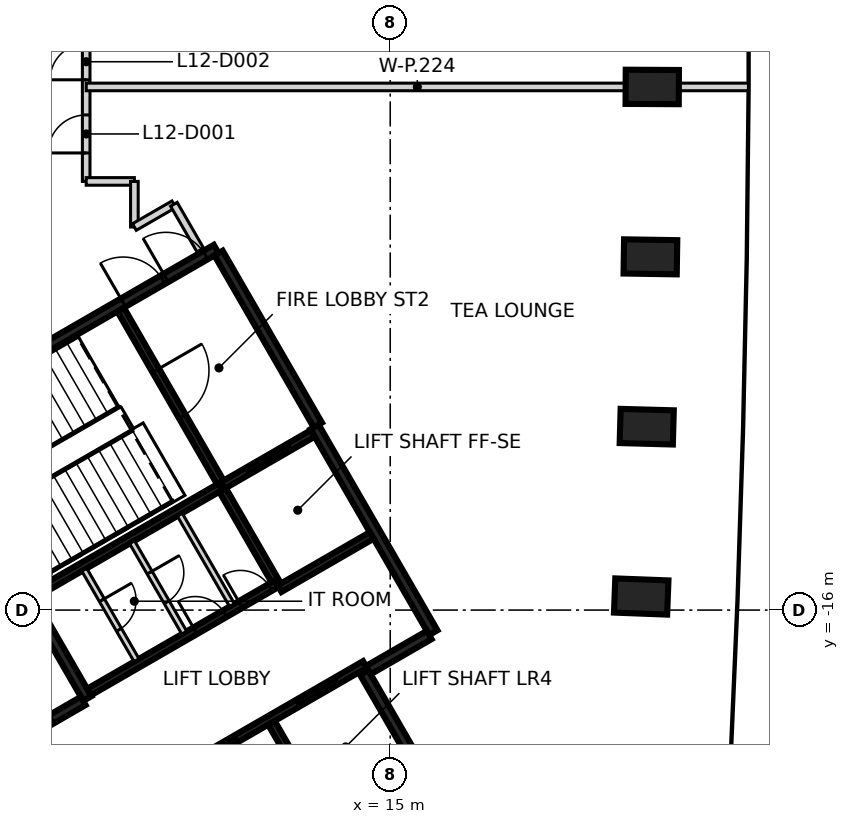
"""IFC4 building model, lengths in metres.
Left out: names, types, materials, properties, quantities, classifications, styles, units other than length and angle.
Written with IfcOpenShell. Run it as: python <this file> out.ifc"""

import sys

from ifc_helpers import new_model, si_unit, direction, frame, frame_2d, origin, origin_2d, place, context, subcontext, project, spatial, rectangle, extrude, element, fill, save


model = new_model("IFC4")
c1 = context("Model", 3, precision=1e-05, world=origin(), true_north=direction((0.0, 1.0)))
c2 = subcontext(c1, "Body", "Model", "MODEL_VIEW")
j1 = project(units=[si_unit("LENGTHUNIT", "METRE"), si_unit("PLANEANGLEUNIT", "RADIAN")], contexts=[c1])
p1 = place(None, origin())
s1 = spatial("IfcSite", under=j1, at=p1, CompositionType="ELEMENT")
p2 = place(p1, origin())
s2 = spatial("IfcBuilding", under=s1, at=p2, CompositionType="ELEMENT")
p3 = place(p2, frame((0.0, 0.0, 56.6)))
s3 = spatial("IfcBuildingStorey", under=s2, at=p3, CompositionType="ELEMENT", Elevation=56.6)
for number, where, z_axis, x_axis in (
    (1, (21.604, -15.643, -0.475), (0.0, 0.0, 1.0), (-0.999, 0.038, 0.0)),
    (2, (21.749, -11.174, -0.475), (0.0, 0.0, 1.0), (-1.0, 0.027, 0.0)),
    (3, (21.846, -6.706, -0.475), (0.0, 0.0, 1.0), (-1.0, 0.016, 0.0)),
    (4, (21.894, -2.235, -0.475), (0.0, 0.0, 1.0), (-1.0, 0.005, 0.0)),
):
    element("IfcColumn", number, at=place(p3, frame(where, z_axis=z_axis, x_axis=x_axis)), inside=s3, PredefinedType="COLUMN", context=c2, shape_type="SweptSolid", body=[
        extrude(rectangle(XDim=1.4, YDim=0.9, at=origin_2d()), origin(), (0.0, 0.0, 1.0), 3.6),
    ])
p4 = place(p3, frame((0.417, -12.273, 0.0), z_axis=(0.0, 0.0, 1.0), x_axis=(0.866021906294, 0.500006057782, 0.0)))
e5 = element("IfcWall", 5, at=p4, inside=s3, PredefinedType="SHEAR", context=c2, shape_type="SweptSolid", body=[
    extrude(rectangle(XDim=11.55, YDim=0.25, at=frame_2d((5.775, 0.0))), origin(), (0.0, 0.0, 1.0), 3.125),
])
p5 = place(p4, frame((10.025, 0.0, 0.0)))
e6 = element("IfcOpeningElement", 6, at=p5, cuts=e5, PredefinedType="OPENING", context=c2, shape_type="SweptSolid", body=[
    extrude(rectangle(XDim=1.2, YDim=2.1, at=frame_2d((0.6, 1.05))), frame((0.0, 0.135, 0.0), z_axis=(0.0, -1.0, 0.0), x_axis=(1.0, 0.0, 0.0)), (0.0, 0.0, 1.0), 0.27),
])
p6 = place(p4, frame((8.725, 0.0, 0.0)))
e7 = element("IfcOpeningElement", 7, at=p6, cuts=e5, PredefinedType="OPENING", context=c2, shape_type="SweptSolid", body=[
    extrude(rectangle(XDim=1.2, YDim=2.1, at=frame_2d((0.6, 1.05))), frame((0.0, 0.135, 0.0), z_axis=(0.0, -1.0, 0.0), x_axis=(1.0, 0.0, 0.0)), (0.0, 0.0, 1.0), 0.27),
])
p7 = place(p3, frame((13.008, -11.181, 0.0), z_axis=(0.0, 0.0, 1.0), x_axis=(0.500004234368, -0.866022959057, 0.0)))
e8 = element("IfcWall", 8, at=p7, inside=s3, PredefinedType="SHEAR", context=c2, shape_type="SweptSolid", body=[
    extrude(rectangle(XDim=6.25, YDim=0.25, at=frame_2d((3.125, 0.0))), origin(), (0.0, 0.0, 1.0), 3.125),
])
p8 = place(p3, frame((10.483, -6.606, 0.0), z_axis=(0.0, 0.0, 1.0), x_axis=(0.49999885962, -0.866026062182, 0.0)))
e9 = element("IfcWall", 9, at=p8, inside=s3, PredefinedType="SHEAR", context=c2, shape_type="SweptSolid", body=[
    extrude(rectangle(XDim=5.225, YDim=0.25, at=frame_2d((2.612, 0.0))), origin(), (0.0, 0.0, 1.0), 3.125),
])
p9 = place(p3, frame((7.031, -18.327, 0.0), z_axis=(0.0, 0.0, 1.0), x_axis=(-0.499971222258, 0.866042017984, 0.0)))
e10 = element("IfcWall", 10, at=p9, inside=s3, PredefinedType="SHEAR", context=c2, shape_type="SweptSolid", body=[
    extrude(rectangle(XDim=3.2, YDim=0.25, at=frame_2d((1.6, 0.0))), origin(), (0.0, 0.0, 1.0), 3.125),
])
p10 = place(p3, frame((14.315, -17.644, 0.0), z_axis=(0.0, 0.0, 1.0), x_axis=(0.500023226632, -0.866011993467, 0.0)))
e11 = element("IfcWall", 11, at=p10, inside=s3, PredefinedType="SHEAR", context=c2, shape_type="SweptSolid", body=[
    extrude(rectangle(XDim=2.974, YDim=0.25, at=frame_2d((1.487, 0.0))), origin(), (0.0, 0.0, 1.0), 3.125),
])
p11 = place(p3, frame((16.025, -16.656, 0.0), z_axis=(0.0, 0.0, 1.0), x_axis=(-0.866016279763, -0.500015802937, 0.0)))
e12 = element("IfcWall", 12, at=p11, inside=s3, PredefinedType="SHEAR", context=c2, shape_type="SweptSolid", body=[
    extrude(rectangle(XDim=1.849, YDim=0.25, at=frame_2d((0.925, 0.0))), origin(), (0.0, 0.0, 1.0), 3.125),
])
p12 = place(p3, frame((6.065, -18.885, 0.0), z_axis=(0.0, 0.0, 1.0), x_axis=(0.866017078145, 0.500014420154, 0.0)))
e13 = element("IfcWall", 13, at=p12, inside=s3, PredefinedType="SHEAR", context=c2, shape_type="SweptSolid", body=[
    extrude(rectangle(XDim=0.989, YDim=0.25, at=frame_2d((0.495, 0.0))), origin(), (0.0, 0.0, 1.0), 3.125),
])
p13 = place(p3, frame((6.08, -20.1, 0.0), z_axis=(0.0, 0.0, 1.0), x_axis=(-0.500051773299, 0.865995510393, 0.0)))
e14 = element("IfcWall", 14, at=p13, inside=s3, PredefinedType="SHEAR", context=c2, shape_type="SweptSolid", body=[
    extrude(rectangle(XDim=0.685, YDim=0.25, at=frame_2d((0.342, 0.0))), origin(), (0.0, 0.0, 1.0), 3.125),
])
p14 = place(p3, frame((9.052, -20.48, 0.0), z_axis=(0.0, 0.0, 1.0), x_axis=(0.866030299012, 0.499991521122, 0.0)))
e15 = element("IfcWall", 15, at=p14, inside=s3, PredefinedType="SHEAR", context=c2, shape_type="SweptSolid", body=[
    extrude(rectangle(XDim=6.1, YDim=0.2, at=frame_2d((3.05, 0.0))), origin(), (0.0, 0.0, 1.0), 3.125),
])
p15 = place(p14, frame((1.0, 0.0, 0.0)))
e16 = element("IfcOpeningElement", 16, at=p15, cuts=e15, PredefinedType="OPENING", context=c2, shape_type="SweptSolid", body=[
    extrude(rectangle(XDim=1.2, YDim=2.1, at=frame_2d((0.6, 1.05))), frame((0.0, 0.11, 0.0), z_axis=(0.0, -1.0, 0.0), x_axis=(1.0, 0.0, 0.0)), (0.0, 0.0, 1.0), 0.22),
])
p16 = place(p14, frame((4.05, 0.0, 0.0)))
e17 = element("IfcOpeningElement", 17, at=p16, cuts=e15, PredefinedType="OPENING", context=c2, shape_type="SweptSolid", body=[
    extrude(rectangle(XDim=1.2, YDim=2.1, at=frame_2d((0.6, 1.05))), frame((0.0, 0.11, 0.0), z_axis=(0.0, -1.0, 0.0), x_axis=(1.0, 0.0, 0.0)), (0.0, 0.0, 1.0), 0.22),
])
p17 = place(p3, frame((10.538, -12.752, 0.0), z_axis=(0.0, 0.0, 1.0), x_axis=(-0.866038630372, -0.499977090179, 0.0)))
e18 = element("IfcWall", 18, at=p17, inside=s3, PredefinedType="SHEAR", context=c2, shape_type="SweptSolid", body=[
    extrude(rectangle(XDim=5.699, YDim=0.2, at=frame_2d((2.85, 0.0))), origin(), (0.0, 0.0, 1.0), 3.125),
])
p18 = place(p3, frame((7.077, -18.156, 0.0), z_axis=(0.0, 0.0, 1.0), x_axis=(0.866038630372, 0.499977090179, 0.0)))
e19 = element("IfcWall", 19, at=p18, inside=s3, PredefinedType="SHEAR", context=c2, shape_type="SweptSolid", body=[
    extrude(rectangle(XDim=5.699, YDim=0.2, at=frame_2d((2.85, 0.0))), origin(), (0.0, 0.0, 1.0), 3.125),
])
p19 = place(p18, frame((3.224, 0.0, 0.0)))
e20 = element("IfcOpeningElement", 20, at=p19, cuts=e19, PredefinedType="OPENING", context=c2, shape_type="SweptSolid", body=[
    extrude(rectangle(XDim=0.9, YDim=2.1, at=frame_2d((0.45, 1.05))), frame((0.0, 0.11, 0.0), z_axis=(0.0, -1.0, 0.0), x_axis=(1.0, 0.0, 0.0)), (0.0, 0.0, 1.0), 0.22),
])
p20 = place(p18, frame((4.599, 0.0, 0.0)))
e21 = element("IfcOpeningElement", 21, at=p20, cuts=e19, PredefinedType="OPENING", context=c2, shape_type="SweptSolid", body=[
    extrude(rectangle(XDim=0.9, YDim=2.1, at=frame_2d((0.45, 1.05))), frame((0.0, 0.11, 0.0), z_axis=(0.0, -1.0, 0.0), x_axis=(1.0, 0.0, 0.0)), (0.0, 0.0, 1.0), 0.22),
])
p21 = place(p3, frame((7.906, -8.094, 0.0), z_axis=(0.0, 0.0, 1.0), x_axis=(0.500024287448, -0.866011380966, 0.0)))
e22 = element("IfcWall", 22, at=p21, inside=s3, PredefinedType="SHEAR", context=c2, shape_type="SweptSolid", body=[
    extrude(rectangle(XDim=5.251, YDim=0.2, at=frame_2d((2.625, 0.0))), origin(), (0.0, 0.0, 1.0), 3.125),
])
p22 = place(p21, frame((1.849, 0.0, 0.0)))
e23 = element("IfcOpeningElement", 23, at=p22, cuts=e22, PredefinedType="OPENING", context=c2, shape_type="SweptSolid", body=[
    extrude(rectangle(XDim=1.4, YDim=2.1, at=frame_2d((0.7, 1.05))), frame((0.0, 0.11, 0.0), z_axis=(0.0, -1.0, 0.0), x_axis=(1.0, 0.0, 0.0)), (0.0, 0.0, 1.0), 0.22),
])
p23 = place(p3, frame((11.875, -18.967, 0.0), z_axis=(0.0, 0.0, 1.0), x_axis=(0.49998131003, -0.866036194175, 0.0)))
e24 = element("IfcWall", 24, at=p23, inside=s3, PredefinedType="SHEAR", context=c2, shape_type="SweptSolid", body=[
    extrude(rectangle(XDim=3.048, YDim=0.2, at=frame_2d((1.524, 0.0))), origin(), (0.0, 0.0, 1.0), 3.125),
])
p24 = place(p3, frame((11.963, -15.22, 0.0), z_axis=(0.0, 0.0, 1.0), x_axis=(-0.500034990121, 0.866005201286, 0.0)))
e25 = element("IfcWall", 25, at=p24, inside=s3, PredefinedType="SHEAR", context=c2, shape_type="SweptSolid", body=[
    extrude(rectangle(XDim=2.75, YDim=0.2, at=frame_2d((1.375, 0.0))), origin(), (0.0, 0.0, 1.0), 3.125),
])
p25 = place(p3, frame((10.587, -12.723, 0.0), z_axis=(0.0, 0.0, 1.0), x_axis=(0.866037306777, 0.499979382845, 0.0)))
e26 = element("IfcWall", 26, at=p25, inside=s3, PredefinedType="SHEAR", context=c2, shape_type="SweptSolid", body=[
    extrude(rectangle(XDim=2.742, YDim=0.2, at=frame_2d((1.371, 0.0))), origin(), (0.0, 0.0, 1.0), 3.125),
])
p26 = place(p25, frame((0.743, 0.0, 0.0)))
e27 = element("IfcOpeningElement", 27, at=p26, cuts=e26, PredefinedType="OPENING", context=c2, shape_type="SweptSolid", body=[
    extrude(rectangle(XDim=1.3, YDim=2.1, at=frame_2d((0.65, 1.05))), frame((0.0, 0.11, 0.0), z_axis=(0.0, -1.0, 0.0), x_axis=(1.0, 0.0, 0.0)), (0.0, 0.0, 1.0), 0.22),
])
p27 = place(p3, frame((14.512, -14.037, 0.0), z_axis=(0.0, 0.0, 1.0), x_axis=(-0.866044696403, -0.499966582715, 0.0)))
e28 = element("IfcWall", 28, at=p27, inside=s3, PredefinedType="SHEAR", context=c2, shape_type="SweptSolid", body=[
    extrude(rectangle(XDim=2.799, YDim=0.2, at=frame_2d((1.399, 0.0))), origin(), (0.0, 0.0, 1.0), 3.125),
])
p28 = place(p3, frame((8.207, -14.214, 0.0), z_axis=(0.0, 0.0, 1.0), x_axis=(0.50002746344, -0.86600954718, 0.0)))
e29 = element("IfcWall", 29, at=p28, inside=s3, PredefinedType="PARTITIONING", context=c2, shape_type="SweptSolid", body=[
    extrude(rectangle(XDim=2.748, YDim=0.15, at=frame_2d((1.374, 0.0))), origin(), (0.0, 0.0, 1.0), 3.125),
])
p29 = place(p28, frame((0.924, 0.0, 0.0)))
e30 = element("IfcOpeningElement", 30, at=p29, cuts=e29, PredefinedType="OPENING", context=c2, shape_type="SweptSolid", body=[
    extrude(rectangle(XDim=0.9, YDim=2.1, at=frame_2d((0.45, 1.05))), frame((0.0, 0.085, 0.0), z_axis=(0.0, -1.0, 0.0), x_axis=(1.0, 0.0, 0.0)), (0.0, 0.0, 1.0), 0.17),
])
p30 = place(p3, frame((9.462, -13.489, 0.0), z_axis=(0.0, 0.0, 1.0), x_axis=(0.499988999718, -0.866031754707, 0.0)))
e31 = element("IfcWall", 31, at=p30, inside=s3, PredefinedType="PARTITIONING", context=c2, shape_type="SweptSolid", body=[
    extrude(rectangle(XDim=2.749, YDim=0.15, at=frame_2d((1.374, 0.0))), origin(), (0.0, 0.0, 1.0), 3.125),
])
p31 = place(p3, frame((6.951, -14.939, 0.0), z_axis=(0.0, 0.0, 1.0), x_axis=(0.499988999718, -0.866031754707, 0.0)))
e32 = element("IfcWall", 32, at=p31, inside=s3, PredefinedType="PARTITIONING", context=c2, shape_type="SweptSolid", body=[
    extrude(rectangle(XDim=2.749, YDim=0.15, at=frame_2d((1.374, 0.0))), origin(), (0.0, 0.0, 1.0), 3.125),
])
p32 = place(p31, frame((0.924, 0.0, 0.0)))
e33 = element("IfcOpeningElement", 33, at=p32, cuts=e32, PredefinedType="OPENING", context=c2, shape_type="SweptSolid", body=[
    extrude(rectangle(XDim=0.9, YDim=2.1, at=frame_2d((0.45, 1.05))), frame((0.0, 0.085, 0.0), z_axis=(0.0, -1.0, 0.0), x_axis=(1.0, 0.0, 0.0)), (0.0, 0.0, 1.0), 0.17),
])
p33 = place(p3, frame((7.0, -4.721, 0.0), z_axis=(0.0, 0.0, 1.0), x_axis=(0.0, 1.0, 0.0)))
e34 = element("IfcWall", 34, at=p33, inside=s3, PredefinedType="PARTITIONING", context=c2, shape_type="SweptSolid", body=[
    extrude(rectangle(XDim=8.799, YDim=0.2, at=frame_2d((4.399, 0.0))), origin(), (0.0, 0.0, 1.0), 3.125),
])
p34 = place(p33, frame((0.749, 0.0, 0.0)))
e35 = element("IfcOpeningElement", 35, at=p34, cuts=e34, PredefinedType="OPENING", context=c2, shape_type="SweptSolid", body=[
    extrude(rectangle(XDim=1.0, YDim=2.1, at=frame_2d((0.5, 1.05))), frame((0.0, 0.11, 0.0), z_axis=(0.0, -1.0, 0.0), x_axis=(1.0, 0.0, 0.0)), (0.0, 0.0, 1.0), 0.22),
])
p35 = place(p33, frame((2.674, 0.0, 0.0)))
e36 = element("IfcOpeningElement", 36, at=p35, cuts=e34, PredefinedType="OPENING", context=c2, shape_type="SweptSolid", body=[
    extrude(rectangle(XDim=0.95, YDim=2.1, at=frame_2d((0.475, 1.05))), frame((0.0, 0.11, 0.0), z_axis=(0.0, -1.0, 0.0), x_axis=(1.0, 0.0, 0.0)), (0.0, 0.0, 1.0), 0.22),
])
p36 = place(p3, frame((7.0, -4.721, 0.0), z_axis=(0.0, 0.0, 1.0), x_axis=(1.0, 0.0, 0.0)))
e37 = element("IfcWall", 37, at=p36, inside=s3, PredefinedType="PARTITIONING", context=c2, shape_type="SweptSolid", body=[
    extrude(rectangle(XDim=1.268, YDim=0.2, at=frame_2d((0.634, 0.0))), origin(), (0.0, 0.0, 1.0), 3.125),
])
p37 = place(p3, frame((8.268, -5.921, 0.0), z_axis=(0.0, 0.0, 1.0), x_axis=(0.0, 1.0, 0.0)))
e38 = element("IfcWall", 38, at=p37, inside=s3, PredefinedType="PARTITIONING", context=c2, shape_type="SweptSolid", body=[
    extrude(rectangle(XDim=1.2, YDim=0.2, at=frame_2d((0.6, 0.0))), origin(), (0.0, 0.0, 1.0), 3.125),
])
p38 = place(p3, frame((8.268, -5.921, 0.0), z_axis=(0.0, 0.0, 1.0), x_axis=(0.866344856625, 0.499446282797, 0.0)))
e39 = element("IfcWall", 39, at=p38, inside=s3, PredefinedType="PARTITIONING", context=c2, shape_type="SweptSolid", body=[
    extrude(rectangle(XDim=1.199, YDim=0.2, at=frame_2d((0.6, 0.0))), origin(), (0.0, 0.0, 1.0), 3.125),
])
p39 = place(p3, frame((9.307, -5.322, 0.0), z_axis=(0.0, 0.0, 1.0), x_axis=(0.500295157811, -0.865854927266, 0.0)))
e40 = element("IfcWall", 40, at=p39, inside=s3, PredefinedType="PARTITIONING", context=c2, shape_type="SweptSolid", body=[
    extrude(rectangle(XDim=1.39, YDim=0.2, at=frame_2d((0.695, 0.0))), origin(), (0.0, 0.0, 1.0), 3.125),
])
p40 = place(p3, frame((7.001, -2.235, 0.0), z_axis=(0.0, 0.0, 1.0), x_axis=(1.0, 0.0, 0.0)))
e41 = element("IfcWall", 41, at=p40, inside=s3, PredefinedType="PARTITIONING", context=c2, shape_type="SweptSolid", body=[
    extrude(rectangle(XDim=17.424, YDim=0.2, at=frame_2d((8.712, 0.0))), origin(), (0.0, 0.0, 1.0), 3.125),
])
p41 = place(p26, origin())
e42 = element("IfcDoor", 42, at=p41, inside=s3, OperationType="SLIDING_TO_LEFT", PredefinedType="DOOR", context=c2, shape_type="SweptSolid", body=[
    extrude(rectangle(XDim=1.3, YDim=2.1, at=frame_2d((0.65, 1.05))), frame((0.0, 0.025, 0.0), z_axis=(0.0, -1.0, 0.0), x_axis=(1.0, 0.0, 0.0)), (0.0, 0.0, 1.0), 0.05),
])
fill(e27, e42)
p42 = place(p15, origin())
e43 = element("IfcDoor", 43, at=p42, inside=s3, OperationType="DOUBLE_DOOR_SLIDING", PredefinedType="DOOR", context=c2, shape_type="SweptSolid", body=[
    extrude(rectangle(XDim=1.2, YDim=2.1, at=frame_2d((0.6, 1.05))), frame((0.0, 0.025, 0.0), z_axis=(0.0, -1.0, 0.0), x_axis=(1.0, 0.0, 0.0)), (0.0, 0.0, 1.0), 0.05),
])
fill(e16, e43)
p43 = place(p16, origin())
e44 = element("IfcDoor", 44, at=p43, inside=s3, OperationType="DOUBLE_DOOR_SLIDING", PredefinedType="DOOR", context=c2, shape_type="SweptSolid", body=[
    extrude(rectangle(XDim=1.2, YDim=2.1, at=frame_2d((0.6, 1.05))), frame((0.0, 0.025, 0.0), z_axis=(0.0, -1.0, 0.0), x_axis=(1.0, 0.0, 0.0)), (0.0, 0.0, 1.0), 0.05),
])
fill(e17, e44)
p44 = place(p5, origin())
e45 = element("IfcDoor", 45, at=p44, inside=s3, OperationType="SINGLE_SWING_LEFT", PredefinedType="DOOR", context=c2, shape_type="SweptSolid", body=[
    extrude(rectangle(XDim=1.2, YDim=2.1, at=frame_2d((0.6, 1.05))), frame((0.0, 0.025, 0.0), z_axis=(0.0, -1.0, 0.0), x_axis=(1.0, 0.0, 0.0)), (0.0, 0.0, 1.0), 0.05),
])
fill(e6, e45)
p45 = place(p6, origin())
e46 = element("IfcDoor", 46, at=p45, inside=s3, OperationType="SINGLE_SWING_RIGHT", PredefinedType="DOOR", context=c2, shape_type="SweptSolid", body=[
    extrude(rectangle(XDim=1.2, YDim=2.1, at=frame_2d((0.6, 1.05))), frame((0.0, 0.025, 0.0), z_axis=(0.0, -1.0, 0.0), x_axis=(1.0, 0.0, 0.0)), (0.0, 0.0, 1.0), 0.05),
])
fill(e7, e46)
p46 = place(p22, origin())
e47 = element("IfcDoor", 47, at=p46, inside=s3, OperationType="SINGLE_SWING_LEFT", PredefinedType="DOOR", context=c2, shape_type="SweptSolid", body=[
    extrude(rectangle(XDim=1.4, YDim=2.1, at=frame_2d((0.7, 1.05))), frame((0.0, 0.025, 0.0), z_axis=(0.0, -1.0, 0.0), x_axis=(1.0, 0.0, 0.0)), (0.0, 0.0, 1.0), 0.05),
])
fill(e23, e47)
p47 = place(p19, origin())
e48 = element("IfcDoor", 48, at=p47, inside=s3, OperationType="SINGLE_SWING_RIGHT", PredefinedType="DOOR", context=c2, shape_type="SweptSolid", body=[
    extrude(rectangle(XDim=0.9, YDim=2.1, at=frame_2d((0.45, 1.05))), frame((0.0, 0.025, 0.0), z_axis=(0.0, -1.0, 0.0), x_axis=(1.0, 0.0, 0.0)), (0.0, 0.0, 1.0), 0.05),
])
fill(e20, e48)
p48 = place(p20, origin())
e49 = element("IfcDoor", 49, at=p48, inside=s3, OperationType="SINGLE_SWING_LEFT", PredefinedType="DOOR", context=c2, shape_type="SweptSolid", body=[
    extrude(rectangle(XDim=0.9, YDim=2.1, at=frame_2d((0.45, 1.05))), frame((0.0, 0.025, 0.0), z_axis=(0.0, -1.0, 0.0), x_axis=(1.0, 0.0, 0.0)), (0.0, 0.0, 1.0), 0.05),
])
fill(e21, e49)
p49 = place(p29, origin())
e50 = element("IfcDoor", 50, at=p49, inside=s3, OperationType="SINGLE_SWING_LEFT", PredefinedType="DOOR", context=c2, shape_type="SweptSolid", body=[
    extrude(rectangle(XDim=0.9, YDim=2.1, at=frame_2d((0.45, 1.05))), frame((0.0, 0.025, 0.0), z_axis=(0.0, -1.0, 0.0), x_axis=(1.0, 0.0, 0.0)), (0.0, 0.0, 1.0), 0.05),
])
fill(e30, e50)
p50 = place(p32, origin())
e51 = element("IfcDoor", 51, at=p50, inside=s3, OperationType="SINGLE_SWING_RIGHT", PredefinedType="DOOR", context=c2, shape_type="SweptSolid", body=[
    extrude(rectangle(XDim=0.9, YDim=2.1, at=frame_2d((0.45, 1.05))), frame((0.0, 0.025, 0.0), z_axis=(0.0, -1.0, 0.0), x_axis=(1.0, 0.0, 0.0)), (0.0, 0.0, 1.0), 0.05),
])
fill(e33, e51)
p51 = place(p34, frame((1.0, 0.0, 0.0), z_axis=(0.0, 0.0, 1.0), x_axis=(-1.0, 0.0, 0.0)))
e52 = element("IfcDoor", 52, at=p51, inside=s3, OperationType="SINGLE_SWING_LEFT", PredefinedType="DOOR", context=c2, shape_type="SweptSolid", body=[
    extrude(rectangle(XDim=1.0, YDim=2.1, at=frame_2d((0.5, 1.05))), frame((0.0, 0.025, 0.0), z_axis=(0.0, -1.0, 0.0), x_axis=(1.0, 0.0, 0.0)), (0.0, 0.0, 1.0), 0.05),
])
fill(e35, e52)
p52 = place(p35, frame((0.95, 0.0, 0.0), z_axis=(0.0, 0.0, 1.0), x_axis=(-1.0, 0.0, 0.0)))
e53 = element("IfcDoor", 53, at=p52, inside=s3, OperationType="SINGLE_SWING_LEFT", PredefinedType="DOOR", context=c2, shape_type="SweptSolid", body=[
    extrude(rectangle(XDim=0.95, YDim=2.1, at=frame_2d((0.475, 1.05))), frame((0.0, 0.025, 0.0), z_axis=(0.0, -1.0, 0.0), x_axis=(1.0, 0.0, 0.0)), (0.0, 0.0, 1.0), 0.05),
])
fill(e36, e53)
save(model, sys.argv[1])
